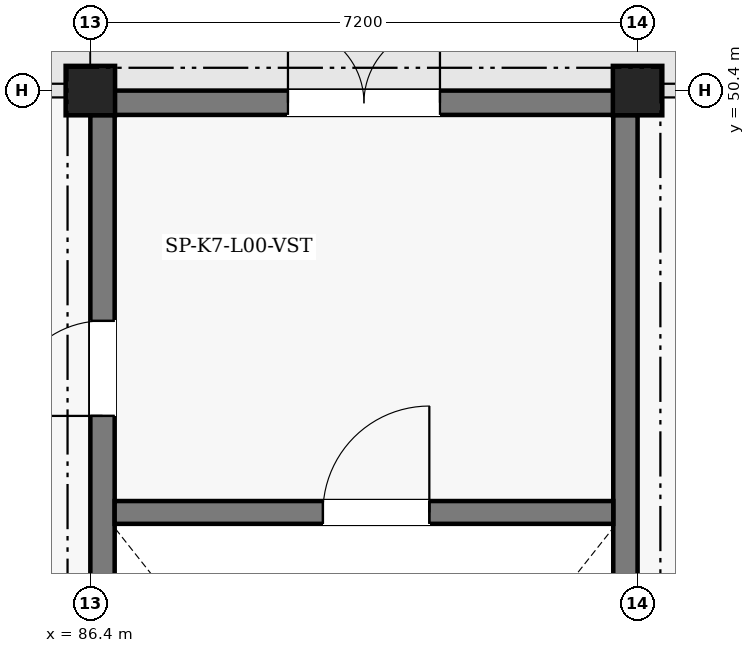
"""IFC4 building model, lengths in metres.
Left out: names, types, materials, properties, quantities, classifications, styles, units other than length and angle.
Written with IfcOpenShell. Run it as: python <this file> out.ifc"""

import sys

from ifc_helpers import new_model, si_unit, direction, frame, frame_2d, origin, origin_2d, place, context, subcontext, project, spatial, rectangle, extrude, element, fill, save


model = new_model("IFC4")
c1 = context("Model", 3, precision=1e-05, world=origin(), true_north=direction((0.0, 1.0)))
c2 = subcontext(c1, "Body", "Model", "MODEL_VIEW")
j1 = project(units=[si_unit("LENGTHUNIT", "METRE"), si_unit("PLANEANGLEUNIT", "RADIAN")], contexts=[c1])
p1 = place(None, origin())
s1 = spatial("IfcSite", under=j1, at=p1, CompositionType="ELEMENT")
p2 = place(p1, origin())
s2 = spatial("IfcBuilding", under=s1, at=p2, CompositionType="ELEMENT")
p3 = place(p2, origin())
s3 = spatial("IfcBuildingStorey", under=s2, at=p3, CompositionType="ELEMENT", Elevation=0.0)
p4 = place(p3, frame((86.4, 50.24, 0.0), z_axis=(0.0, 0.0, 1.0), x_axis=(1.0, 0.0, 0.0)))
e1 = element("IfcWall", 1, at=p4, inside=s3, PredefinedType="SHEAR", context=c2, shape_type="SweptSolid", body=[
    extrude(rectangle(XDim=7.2, YDim=0.32, at=frame_2d((3.6, 0.0))), origin(), (0.0, 0.0, 1.0), 5.4),
])
p5 = place(p4, frame((2.6, 0.0, 0.0)))
e2 = element("IfcOpeningElement", 2, at=p5, cuts=e1, PredefinedType="OPENING", context=c2, shape_type="SweptSolid", body=[
    extrude(rectangle(XDim=2.0, YDim=2.3, at=frame_2d((1.0, 1.15))), frame((0.0, 0.17, 0.0), z_axis=(0.0, -1.0, 0.0), x_axis=(1.0, 0.0, 0.0)), (0.0, 0.0, 1.0), 0.34),
])
p6 = place(p3, frame((93.44, 50.08, 0.0), z_axis=(0.0, 0.0, 1.0), x_axis=(0.0, -1.0, 0.0)))
e3 = element("IfcWall", 3, at=p6, inside=s3, PredefinedType="SHEAR", context=c2, shape_type="SweptSolid", body=[
    extrude(rectangle(XDim=13.76, YDim=0.32, at=frame_2d((6.88, 0.0))), origin(), (0.0, 0.0, 1.0), 5.4),
])
p7 = place(p3, frame((86.56, 36.32, 0.0), z_axis=(0.0, 0.0, 1.0), x_axis=(0.0, 1.0, 0.0)))
e4 = element("IfcWall", 4, at=p7, inside=s3, PredefinedType="SHEAR", context=c2, shape_type="SweptSolid", body=[
    extrude(rectangle(XDim=13.76, YDim=0.32, at=frame_2d((6.88, 0.0))), origin(), (0.0, 0.0, 1.0), 5.4),
])
p8 = place(p7, frame((9.8, 0.0, 0.0)))
e5 = element("IfcOpeningElement", 5, at=p8, cuts=e4, PredefinedType="OPENING", context=c2, shape_type="SweptSolid", body=[
    extrude(rectangle(XDim=1.25, YDim=2.2, at=frame_2d((0.625, 1.1))), frame((0.0, 0.17, 0.0), z_axis=(0.0, -1.0, 0.0), x_axis=(1.0, 0.0, 0.0)), (0.0, 0.0, 1.0), 0.34),
])
p9 = place(p3, frame((86.72, 44.85, 0.0), z_axis=(0.0, 0.0, 1.0), x_axis=(1.0, 0.0, 0.0)))
e6 = element("IfcWall", 6, at=p9, inside=s3, PredefinedType="SHEAR", context=c2, shape_type="SweptSolid", body=[
    extrude(rectangle(XDim=6.56, YDim=0.3, at=frame_2d((3.28, 0.0))), origin(), (0.0, 0.0, 1.0), 5.4),
])
p10 = place(p9, frame((2.74, 0.0, 0.0)))
e7 = element("IfcOpeningElement", 7, at=p10, cuts=e6, PredefinedType="OPENING", context=c2, shape_type="SweptSolid", body=[
    extrude(rectangle(XDim=1.4, YDim=2.2, at=frame_2d((0.7, 1.1))), frame((0.0, 0.16, 0.0), z_axis=(0.0, -1.0, 0.0), x_axis=(1.0, 0.0, 0.0)), (0.0, 0.0, 1.0), 0.32),
])
for number, where, z_axis, x_axis in (
    (8, (86.4, 50.4, 0.0), (0.0, 0.0, 1.0), (1.0, 0.0, 0.0)),
    (9, (93.6, 50.4, 0.0), (0.0, 0.0, 1.0), (1.0, 0.0, 0.0)),
):
    element("IfcColumn", number, at=place(p3, frame(where, z_axis=z_axis, x_axis=x_axis)), inside=s3, PredefinedType="COLUMN", context=c2, shape_type="SweptSolid", body=[
        extrude(rectangle(XDim=0.65, YDim=0.65, at=origin_2d()), origin(), (0.0, 0.0, 1.0), 5.4),
    ])
p11 = place(p5, origin())
e10 = element("IfcDoor", 10, at=p11, inside=s3, OperationType="DOUBLE_DOOR_SINGLE_SWING", PredefinedType="DOOR", context=c2, shape_type="SweptSolid", body=[
    extrude(rectangle(XDim=2.0, YDim=2.3, at=frame_2d((1.0, 1.15))), frame((0.0, 0.025, 0.0), z_axis=(0.0, -1.0, 0.0), x_axis=(1.0, 0.0, 0.0)), (0.0, 0.0, 1.0), 0.05),
])
fill(e2, e10)
p12 = place(p10, origin())
e11 = element("IfcDoor", 11, at=p12, inside=s3, OperationType="SINGLE_SWING_RIGHT", PredefinedType="DOOR", context=c2, shape_type="SweptSolid", body=[
    extrude(rectangle(XDim=1.4, YDim=2.2, at=frame_2d((0.7, 1.1))), frame((0.0, 0.025, 0.0), z_axis=(0.0, -1.0, 0.0), x_axis=(1.0, 0.0, 0.0)), (0.0, 0.0, 1.0), 0.05),
])
fill(e7, e11)
p13 = place(p8, origin())
e12 = element("IfcDoor", 12, at=p13, inside=s3, OperationType="SINGLE_SWING_LEFT", PredefinedType="DOOR", context=c2, shape_type="SweptSolid", body=[
    extrude(rectangle(XDim=1.25, YDim=2.2, at=frame_2d((0.625, 1.1))), frame((0.0, 0.025, 0.0), z_axis=(0.0, -1.0, 0.0), x_axis=(1.0, 0.0, 0.0)), (0.0, 0.0, 1.0), 0.05),
])
fill(e5, e12)
save(model, sys.argv[1])
